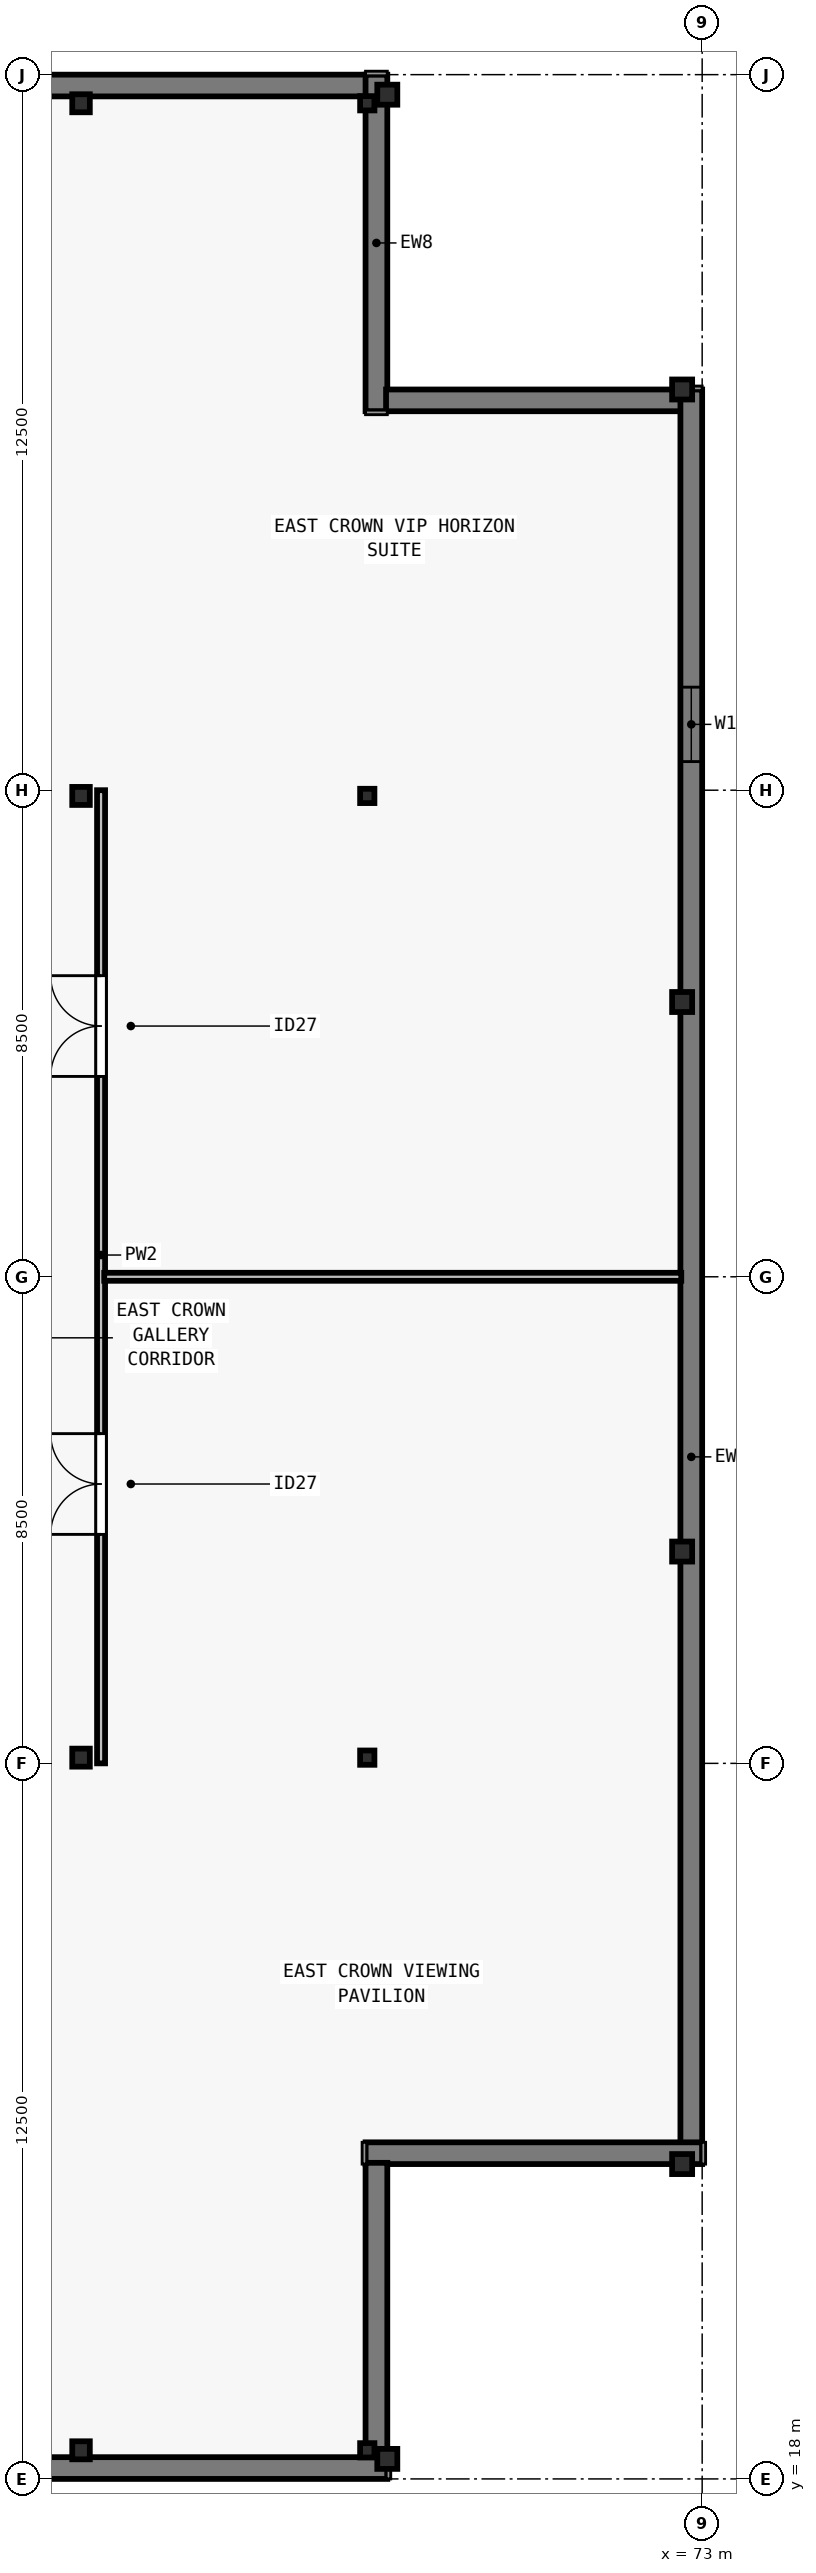
"""IFC4 building model, lengths in metres.
Left out: names, types, materials, properties, quantities, classifications, styles, units other than length and angle.
Written with IfcOpenShell. Run it as: python <this file> out.ifc"""

import sys

from ifc_helpers import new_model, si_unit, direction, frame, frame_2d, origin, origin_2d, place, context, subcontext, project, spatial, rectangle, i_section, extrude, element, fill, save


model = new_model("IFC4")
c1 = context("Model", 3, precision=1e-05, world=origin(), true_north=direction((0.0, 1.0)))
c2 = subcontext(c1, "Body", "Model", "MODEL_VIEW")
j1 = project(units=[si_unit("LENGTHUNIT", "METRE"), si_unit("PLANEANGLEUNIT", "RADIAN")], contexts=[c1])
p1 = place(None, origin())
s1 = spatial("IfcSite", under=j1, at=p1, CompositionType="ELEMENT")
p2 = place(p1, origin())
s2 = spatial("IfcBuilding", under=s1, at=p2, CompositionType="ELEMENT")
p3 = place(p2, frame((0.0, 0.0, 324.5)))
s3 = spatial("IfcBuildingStorey", under=s2, at=p3, CompositionType="ELEMENT", Elevation=324.5)
for number, where, z_axis, x_axis in (
    (1, (67.5, 18.35, 0.0), (0.0, 0.0, 1.0), (1.0, 0.0, 0.0)),
    (2, (72.65, 23.5, 0.0), (0.0, 0.0, 1.0), (1.0, 0.0, 0.0)),
    (3, (72.65, 34.2, 0.0), (0.0, 0.0, 1.0), (1.0, 0.0, 0.0)),
    (4, (72.65, 43.8, 0.0), (0.0, 0.0, 1.0), (1.0, 0.0, 0.0)),
    (5, (72.65, 54.5, 0.0), (0.0, 0.0, 1.0), (1.0, 0.0, 0.0)),
    (6, (67.5, 59.65, 0.0), (0.0, 0.0, 1.0), (1.0, 0.0, 0.0)),
):
    element("IfcColumn", number, at=place(p3, frame(where, z_axis=z_axis, x_axis=x_axis)), inside=s3, PredefinedType="COLUMN", context=c2, shape_type="SweptSolid", body=[
        extrude(i_section(OverallWidth=0.35, OverallDepth=0.35, WebThickness=0.02, FlangeThickness=0.028, at=origin_2d()), origin(), (0.0, 0.0, 1.0), 5.5),
    ])
p4 = place(p3, frame((62.15, 18.5, 0.0), z_axis=(0.0, 0.0, 1.0), x_axis=(1.0, 0.0, 0.0)))
e7 = element("IfcColumn", 7, at=p4, inside=s3, PredefinedType="COLUMN", context=c2, shape_type="SweptSolid", body=[
    extrude(i_section(OverallWidth=0.307, OverallDepth=0.315, WebThickness=0.012, FlangeThickness=0.019, FilletRadius=0.016, at=origin_2d()), origin(), (0.0, 0.0, 1.0), 5.5),
])
p5 = place(p3, frame((67.15, 18.5, 0.0), z_axis=(0.0, 0.0, 1.0), x_axis=(1.0, 0.0, 0.0)))
e8 = element("IfcColumn", 8, at=p5, inside=s3, PredefinedType="PILASTER", context=c2, shape_type="SweptSolid", body=[
    extrude(i_section(OverallWidth=0.203, OverallDepth=0.203, WebThickness=0.009, FlangeThickness=0.014, FilletRadius=0.01, at=origin_2d()), origin(), (0.0, 0.0, 1.0), 5.5),
])
p6 = place(p3, frame((62.15, 30.6, 0.0), z_axis=(0.0, 0.0, 1.0), x_axis=(1.0, 0.0, 0.0)))
e9 = element("IfcColumn", 9, at=p6, inside=s3, PredefinedType="COLUMN", context=c2, shape_type="SweptSolid", body=[
    extrude(i_section(OverallWidth=0.307, OverallDepth=0.315, WebThickness=0.012, FlangeThickness=0.019, FilletRadius=0.016, at=origin_2d()), origin(), (0.0, 0.0, 1.0), 5.5),
])
p7 = place(p3, frame((67.15, 30.6, 0.0), z_axis=(0.0, 0.0, 1.0), x_axis=(1.0, 0.0, 0.0)))
e10 = element("IfcColumn", 10, at=p7, inside=s3, PredefinedType="PILASTER", context=c2, shape_type="SweptSolid", body=[
    extrude(i_section(OverallWidth=0.203, OverallDepth=0.203, WebThickness=0.009, FlangeThickness=0.014, FilletRadius=0.01, at=origin_2d()), origin(), (0.0, 0.0, 1.0), 5.5),
])
p8 = place(p3, frame((62.15, 47.4, 0.0), z_axis=(0.0, 0.0, 1.0), x_axis=(1.0, 0.0, 0.0)))
e11 = element("IfcColumn", 11, at=p8, inside=s3, PredefinedType="COLUMN", context=c2, shape_type="SweptSolid", body=[
    extrude(i_section(OverallWidth=0.307, OverallDepth=0.315, WebThickness=0.012, FlangeThickness=0.019, FilletRadius=0.016, at=origin_2d()), origin(), (0.0, 0.0, 1.0), 5.5),
])
p9 = place(p3, frame((67.15, 47.4, 0.0), z_axis=(0.0, 0.0, 1.0), x_axis=(1.0, 0.0, 0.0)))
e12 = element("IfcColumn", 12, at=p9, inside=s3, PredefinedType="PILASTER", context=c2, shape_type="SweptSolid", body=[
    extrude(i_section(OverallWidth=0.203, OverallDepth=0.203, WebThickness=0.009, FlangeThickness=0.014, FilletRadius=0.01, at=origin_2d()), origin(), (0.0, 0.0, 1.0), 5.5),
])
p10 = place(p3, frame((62.15, 59.5, 0.0), z_axis=(0.0, 0.0, 1.0), x_axis=(1.0, 0.0, 0.0)))
e13 = element("IfcColumn", 13, at=p10, inside=s3, PredefinedType="COLUMN", context=c2, shape_type="SweptSolid", body=[
    extrude(i_section(OverallWidth=0.307, OverallDepth=0.315, WebThickness=0.012, FlangeThickness=0.019, FilletRadius=0.016, at=origin_2d()), origin(), (0.0, 0.0, 1.0), 5.5),
])
p11 = place(p3, frame((67.15, 59.5, 0.0), z_axis=(0.0, 0.0, 1.0), x_axis=(1.0, 0.0, 0.0)))
e14 = element("IfcColumn", 14, at=p11, inside=s3, PredefinedType="PILASTER", context=c2, shape_type="SweptSolid", body=[
    extrude(i_section(OverallWidth=0.203, OverallDepth=0.203, WebThickness=0.009, FlangeThickness=0.014, FilletRadius=0.01, at=origin_2d()), origin(), (0.0, 0.0, 1.0), 5.5),
])
p12 = place(p3, frame((61.45, 59.81, 0.0), z_axis=(0.0, 0.0, 1.0), x_axis=(1.0, 0.0, 0.0)))
e15 = element("IfcWall", 15, at=p12, inside=s3, PredefinedType="SOLIDWALL", context=c2, shape_type="SweptSolid", body=[
    extrude(rectangle(XDim=5.692, YDim=0.38, at=frame_2d((2.846, 0.0))), origin(), (0.0, 0.0, 1.0), 5.25),
])
p13 = place(p3, frame((67.31, 60.0, 0.0), z_axis=(0.0, 0.0, 1.0), x_axis=(0.0, -1.0, 0.0)))
e16 = element("IfcWall", 16, at=p13, inside=s3, PredefinedType="SOLIDWALL", context=c2, shape_type="SweptSolid", body=[
    extrude(rectangle(XDim=5.88, YDim=0.38, at=frame_2d((2.94, 0.0))), origin(), (0.0, 0.0, 1.0), 5.25),
])
p14 = place(p3, frame((67.478, 54.31, 0.0), z_axis=(0.0, 0.0, 1.0), x_axis=(1.0, 0.0, 0.0)))
e17 = element("IfcWall", 17, at=p14, inside=s3, PredefinedType="SOLIDWALL", context=c2, shape_type="SweptSolid", body=[
    extrude(rectangle(XDim=5.164, YDim=0.38, at=frame_2d((2.582, 0.0))), origin(), (0.0, 0.0, 1.0), 5.25),
])
p15 = place(p3, frame((72.81, 54.5, 0.0), z_axis=(0.0, 0.0, 1.0), x_axis=(0.0, -1.0, 0.0)))
e18 = element("IfcWall", 18, at=p15, inside=s3, PredefinedType="SOLIDWALL", context=c2, shape_type="SweptSolid", body=[
    extrude(rectangle(XDim=30.642, YDim=0.38, at=frame_2d((15.321, 0.0))), origin(), (0.0, 0.0, 1.0), 5.25),
])
p16 = place(p15, frame((5.2, 0.0, 0.8)))
e19 = element("IfcOpeningElement", 19, at=p16, cuts=e18, PredefinedType="OPENING", context=c2, shape_type="SweptSolid", body=[
    extrude(rectangle(XDim=1.3, YDim=2.05, at=frame_2d((0.65, 1.025))), frame((0.0, 0.2, 0.0), z_axis=(0.0, -1.0, 0.0), x_axis=(1.0, 0.0, 0.0)), (0.0, 0.0, 1.0), 0.4),
])
p17 = place(p3, frame((73.0, 23.69, 0.0), z_axis=(0.0, 0.0, 1.0), x_axis=(-1.0, 0.0, 0.0)))
e20 = element("IfcWall", 20, at=p17, inside=s3, PredefinedType="SOLIDWALL", context=c2, shape_type="SweptSolid", body=[
    extrude(rectangle(XDim=5.88, YDim=0.38, at=frame_2d((2.94, 0.0))), origin(), (0.0, 0.0, 1.0), 5.25),
])
p18 = place(p3, frame((67.31, 23.522, 0.0), z_axis=(0.0, 0.0, 1.0), x_axis=(0.0, -1.0, 0.0)))
e21 = element("IfcWall", 21, at=p18, inside=s3, PredefinedType="SOLIDWALL", context=c2, shape_type="SweptSolid", body=[
    extrude(rectangle(XDim=5.164, YDim=0.38, at=frame_2d((2.582, 0.0))), origin(), (0.0, 0.0, 1.0), 5.25),
])
p19 = place(p3, frame((67.5, 18.19, 0.0), z_axis=(0.0, 0.0, 1.0), x_axis=(-1.0, 0.0, 0.0)))
e22 = element("IfcWall", 22, at=p19, inside=s3, PredefinedType="SOLIDWALL", context=c2, shape_type="SweptSolid", body=[
    extrude(rectangle(XDim=6.05, YDim=0.38, at=frame_2d((3.025, 0.0))), origin(), (0.0, 0.0, 1.0), 5.25),
])
p20 = place(p3, frame((62.5, 30.5, 0.0), z_axis=(0.0, 0.0, 1.0), x_axis=(0.0, 1.0, 0.0)))
e23 = element("IfcWall", 23, at=p20, inside=s3, PredefinedType="PARTITIONING", context=c2, shape_type="SweptSolid", body=[
    extrude(rectangle(XDim=17.0, YDim=0.14, at=frame_2d((8.5, 0.0))), origin(), (0.0, 0.0, 1.0), 5.25),
])
p21 = place(p20, frame((4.0, 0.0, 0.0)))
e24 = element("IfcOpeningElement", 24, at=p21, cuts=e23, PredefinedType="OPENING", context=c2, shape_type="SweptSolid", body=[
    extrude(rectangle(XDim=1.76, YDim=2.2, at=frame_2d((0.88, 1.1))), frame((0.0, 0.08, 0.0), z_axis=(0.0, -1.0, 0.0), x_axis=(1.0, 0.0, 0.0)), (0.0, 0.0, 1.0), 0.16),
])
p22 = place(p20, frame((12.0, 0.0, 0.0)))
e25 = element("IfcOpeningElement", 25, at=p22, cuts=e23, PredefinedType="OPENING", context=c2, shape_type="SweptSolid", body=[
    extrude(rectangle(XDim=1.76, YDim=2.2, at=frame_2d((0.88, 1.1))), frame((0.0, 0.08, 0.0), z_axis=(0.0, -1.0, 0.0), x_axis=(1.0, 0.0, 0.0)), (0.0, 0.0, 1.0), 0.16),
])
p23 = place(p3, frame((62.555, 39.0, 0.0), z_axis=(0.0, 0.0, 1.0), x_axis=(1.0, 0.0, 0.0)))
e26 = element("IfcWall", 26, at=p23, inside=s3, PredefinedType="PARTITIONING", context=c2, shape_type="SweptSolid", body=[
    extrude(rectangle(XDim=10.08, YDim=0.14, at=frame_2d((5.04, 0.0))), origin(), (0.0, 0.0, 1.0), 5.25),
])
p24 = place(p16, origin())
e27 = element("IfcWindow", 27, at=p24, inside=s3, PartitioningType="SINGLE_PANEL", PredefinedType="WINDOW", context=c2, shape_type="SweptSolid", body=[
    extrude(rectangle(XDim=1.3, YDim=2.05, at=frame_2d((0.65, 1.025))), frame((0.0, -0.05, 0.0), z_axis=(0.0, -1.0, 0.0), x_axis=(1.0, 0.0, 0.0)), (0.0, 0.0, 1.0), 0.06),
])
fill(e19, e27)
p25 = place(p21, origin())
e28 = element("IfcDoor", 28, at=p25, inside=s3, OperationType="DOUBLE_DOOR_SINGLE_SWING", PredefinedType="DOOR", context=c2, shape_type="SweptSolid", body=[
    extrude(rectangle(XDim=1.76, YDim=2.2, at=frame_2d((0.88, 1.1))), frame((0.0, 0.025, 0.0), z_axis=(0.0, -1.0, 0.0), x_axis=(1.0, 0.0, 0.0)), (0.0, 0.0, 1.0), 0.05),
])
fill(e24, e28)
p26 = place(p22, origin())
e29 = element("IfcDoor", 29, at=p26, inside=s3, OperationType="DOUBLE_DOOR_SINGLE_SWING", PredefinedType="DOOR", context=c2, shape_type="SweptSolid", body=[
    extrude(rectangle(XDim=1.76, YDim=2.2, at=frame_2d((0.88, 1.1))), frame((0.0, 0.025, 0.0), z_axis=(0.0, -1.0, 0.0), x_axis=(1.0, 0.0, 0.0)), (0.0, 0.0, 1.0), 0.05),
])
fill(e25, e29)
save(model, sys.argv[1])
